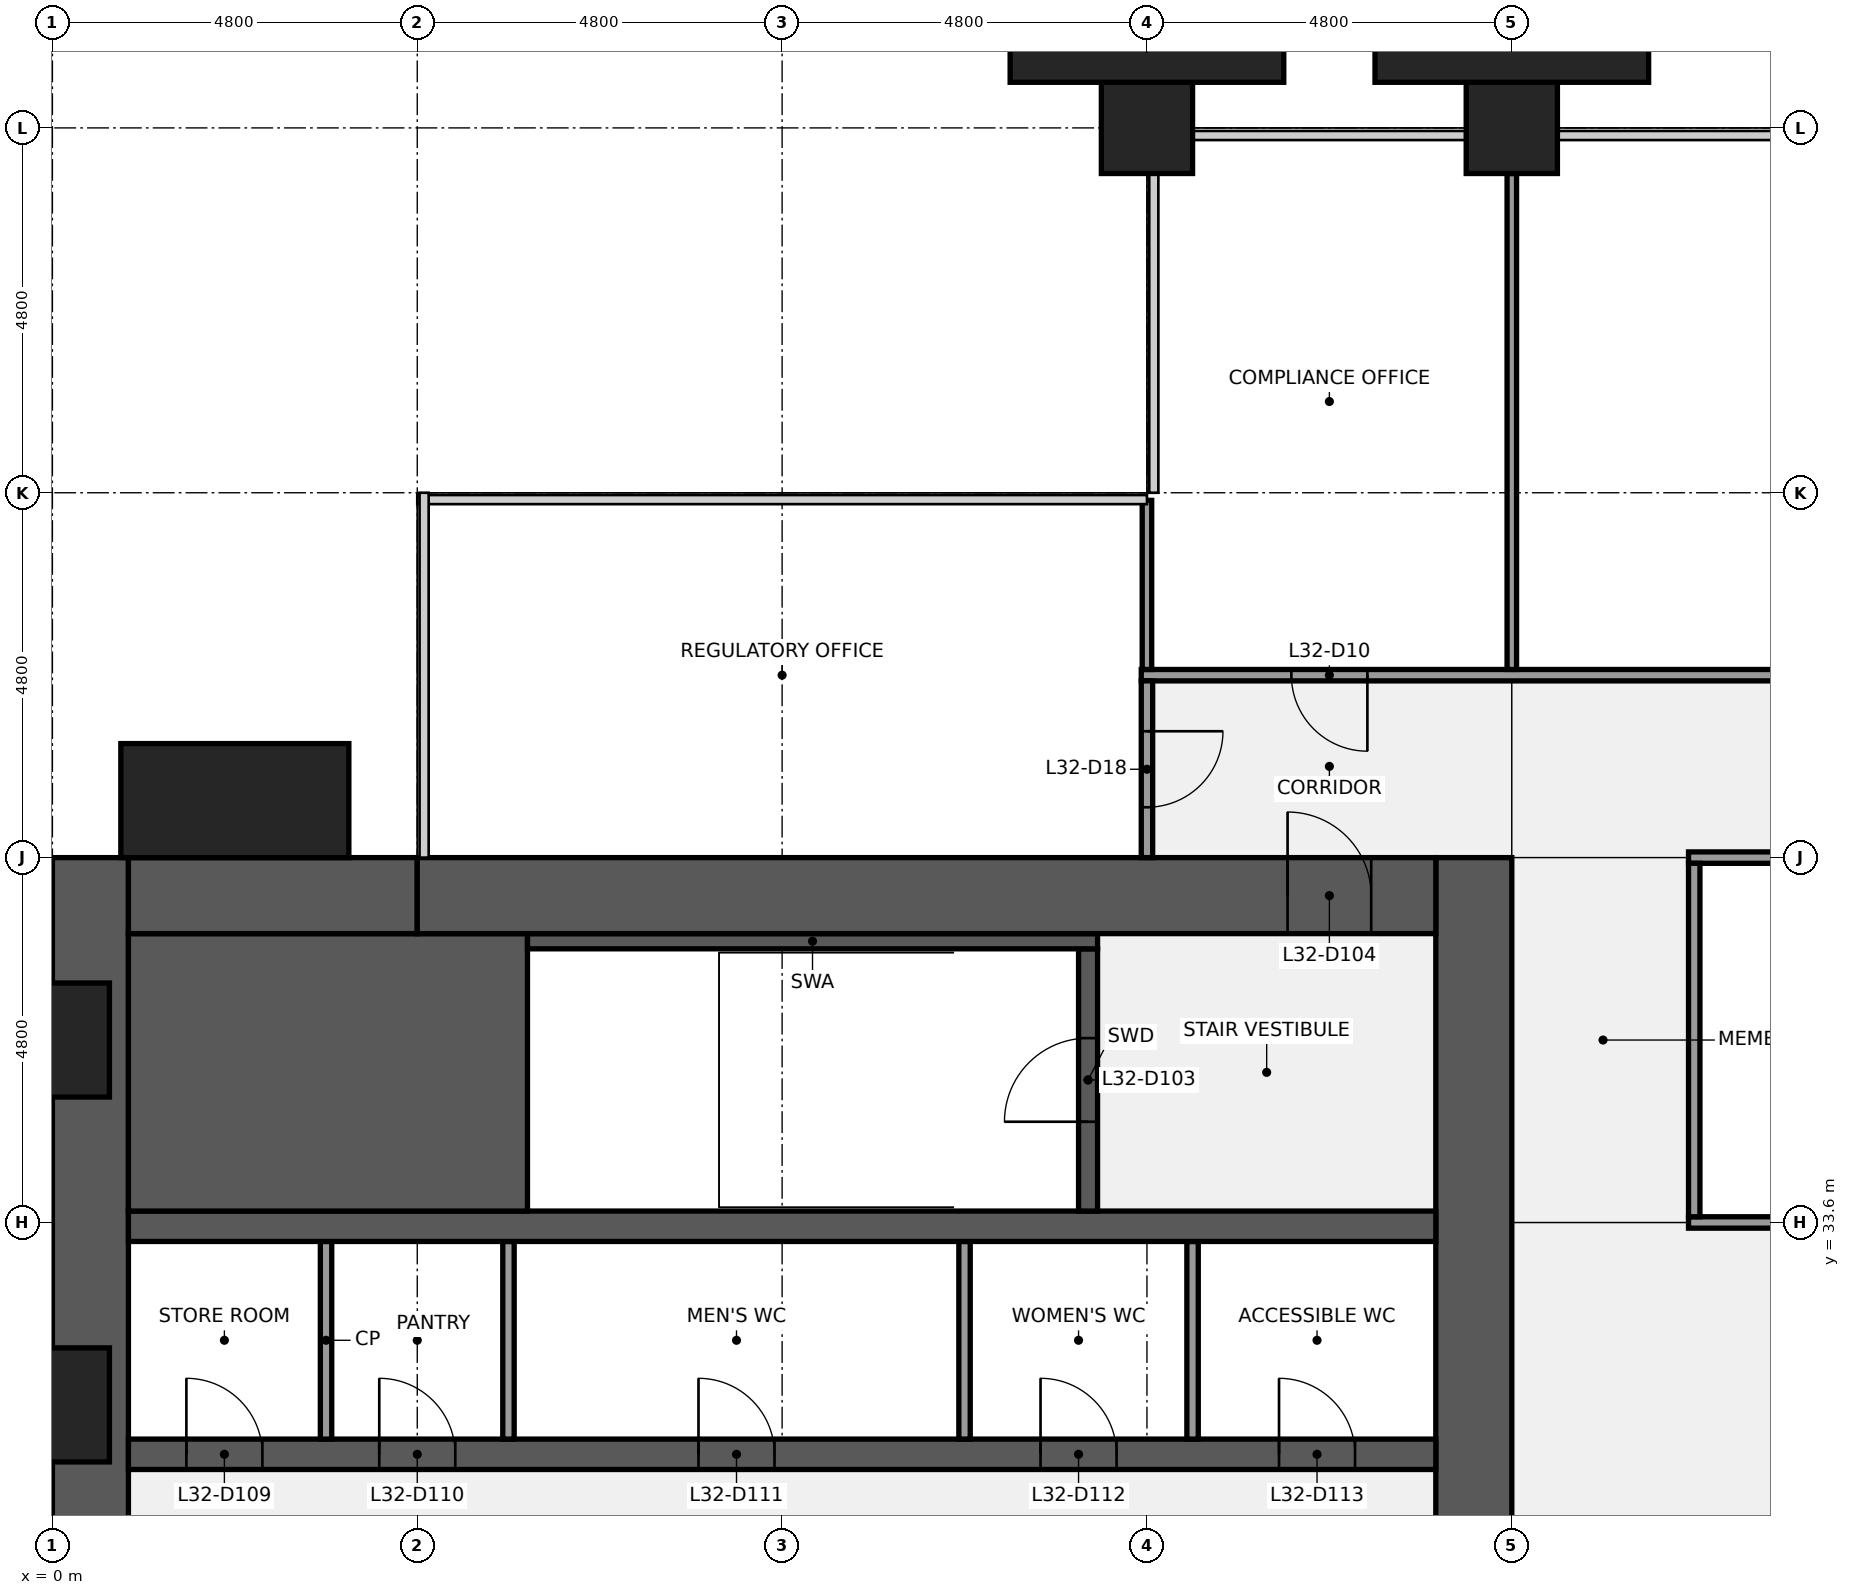
"""IFC4 building model, lengths in metres.
Left out: names, types, materials, properties, quantities, classifications, styles, units other than length and angle.
Written with IfcOpenShell. Run it as: python <this file> out.ifc"""

import sys

from ifc_helpers import new_model, si_unit, direction, frame, frame_2d, origin, origin_2d, place, context, subcontext, project, spatial, rectangle, extrude, element, fill, save


model = new_model("IFC4")
c1 = context("Model", 3, precision=1e-05, world=origin(), true_north=direction((0.0, 1.0)))
c2 = subcontext(c1, "Body", "Model", "MODEL_VIEW")
j1 = project(units=[si_unit("LENGTHUNIT", "METRE"), si_unit("PLANEANGLEUNIT", "RADIAN")], contexts=[c1])
p1 = place(None, origin())
s1 = spatial("IfcSite", under=j1, at=p1, CompositionType="ELEMENT")
p2 = place(p1, origin())
s2 = spatial("IfcBuilding", under=s1, at=p2, CompositionType="ELEMENT")
p3 = place(p2, frame((0.0, 0.0, 148.1)))
s3 = spatial("IfcBuildingStorey", under=s2, at=p3, CompositionType="ELEMENT", Elevation=148.1)
for number, where, z_axis, x_axis in (
    (1, (14.4, 48.0, 0.0), (0.0, 0.0, 1.0), (1.0, 0.0, 0.0)),
    (2, (19.2, 48.0, 0.0), (0.0, 0.0, 1.0), (1.0, 0.0, 0.0)),
):
    element("IfcColumn", number, at=place(p3, frame(where, z_axis=z_axis, x_axis=x_axis)), inside=s3, PredefinedType="COLUMN", context=c2, shape_type="SweptSolid", body=[
        extrude(rectangle(XDim=1.2, YDim=1.2, at=origin_2d()), origin(), (0.0, 0.0, 1.0), 4.0),
    ])
p4 = place(p3, frame((0.5, 9.6, 0.0), z_axis=(0.0, 0.0, 1.0), x_axis=(0.0, 1.0, 0.0)))
e3 = element("IfcWall", 3, at=p4, inside=s3, PredefinedType="SHEAR", context=c2, shape_type="SweptSolid", body=[
    extrude(rectangle(XDim=28.8, YDim=1.0, at=frame_2d((14.4, 0.0))), origin(), (0.0, 0.0, 1.0), 3.84),
])
p5 = place(p4, frame((8.85, 0.0, 0.9)))
e4 = element("IfcOpeningElement", 4, at=p5, cuts=e3, PredefinedType="OPENING", context=c2, shape_type="SweptSolid", body=[
    extrude(rectangle(XDim=1.5, YDim=1.5, at=frame_2d((0.75, 0.75))), frame((0.0, 0.51, 0.0), z_axis=(0.0, -1.0, 0.0), x_axis=(1.0, 0.0, 0.0)), (0.0, 0.0, 1.0), 1.02),
])
p6 = place(p4, frame((18.45, 0.0, 0.9)))
e5 = element("IfcOpeningElement", 5, at=p6, cuts=e3, PredefinedType="OPENING", context=c2, shape_type="SweptSolid", body=[
    extrude(rectangle(XDim=1.5, YDim=1.5, at=frame_2d((0.75, 0.75))), frame((0.0, 0.51, 0.0), z_axis=(0.0, -1.0, 0.0), x_axis=(1.0, 0.0, 0.0)), (0.0, 0.0, 1.0), 1.02),
])
p7 = place(p3, frame((18.7, 38.4, 0.0), z_axis=(0.0, 0.0, 1.0), x_axis=(0.0, -1.0, 0.0)))
e6 = element("IfcWall", 6, at=p7, inside=s3, PredefinedType="SHEAR", context=c2, shape_type="SweptSolid", body=[
    extrude(rectangle(XDim=28.8, YDim=1.0, at=frame_2d((14.4, 0.0))), origin(), (0.0, 0.0, 1.0), 3.84),
])
p8 = place(p7, frame((18.3, 0.0, 0.0)))
e7 = element("IfcOpeningElement", 7, at=p8, cuts=e6, PredefinedType="OPENING", context=c2, shape_type="SweptSolid", body=[
    extrude(rectangle(XDim=1.8, YDim=2.1, at=frame_2d((0.9, 1.05))), frame((0.0, 0.51, 0.0), z_axis=(0.0, -1.0, 0.0), x_axis=(1.0, 0.0, 0.0)), (0.0, 0.0, 1.0), 1.02),
])
p9 = place(p7, frame((8.7, 0.0, 0.0)))
e8 = element("IfcOpeningElement", 8, at=p9, cuts=e6, PredefinedType="OPENING", context=c2, shape_type="SweptSolid", body=[
    extrude(rectangle(XDim=1.8, YDim=2.1, at=frame_2d((0.9, 1.05))), frame((0.0, 0.51, 0.0), z_axis=(0.0, -1.0, 0.0), x_axis=(1.0, 0.0, 0.0)), (0.0, 0.0, 1.0), 1.02),
])
p10 = place(p3, frame((1.0, 30.55, 0.0), z_axis=(0.0, 0.0, 1.0), x_axis=(1.0, 0.0, 0.0)))
e9 = element("IfcWall", 9, at=p10, inside=s3, PredefinedType="SHEAR", context=c2, shape_type="SweptSolid", body=[
    extrude(rectangle(XDim=17.2, YDim=0.4, at=frame_2d((8.6, 0.0))), origin(), (0.0, 0.0, 1.0), 3.84),
])
p11 = place(p10, frame((0.762, 0.0, 0.0)))
e10 = element("IfcOpeningElement", 10, at=p11, cuts=e9, PredefinedType="OPENING", context=c2, shape_type="SweptSolid", body=[
    extrude(rectangle(XDim=1.0, YDim=2.1, at=frame_2d((0.5, 1.05))), frame((0.0, 0.21, 0.0), z_axis=(0.0, -1.0, 0.0), x_axis=(1.0, 0.0, 0.0)), (0.0, 0.0, 1.0), 0.42),
])
p12 = place(p10, frame((3.3, 0.0, 0.0)))
e11 = element("IfcOpeningElement", 11, at=p12, cuts=e9, PredefinedType="OPENING", context=c2, shape_type="SweptSolid", body=[
    extrude(rectangle(XDim=1.0, YDim=2.1, at=frame_2d((0.5, 1.05))), frame((0.0, 0.21, 0.0), z_axis=(0.0, -1.0, 0.0), x_axis=(1.0, 0.0, 0.0)), (0.0, 0.0, 1.0), 0.42),
])
p13 = place(p10, frame((7.5, 0.0, 0.0)))
e12 = element("IfcOpeningElement", 12, at=p13, cuts=e9, PredefinedType="OPENING", context=c2, shape_type="SweptSolid", body=[
    extrude(rectangle(XDim=1.0, YDim=2.1, at=frame_2d((0.5, 1.05))), frame((0.0, 0.21, 0.0), z_axis=(0.0, -1.0, 0.0), x_axis=(1.0, 0.0, 0.0)), (0.0, 0.0, 1.0), 0.42),
])
p14 = place(p10, frame((12.0, 0.0, 0.0)))
e13 = element("IfcOpeningElement", 13, at=p14, cuts=e9, PredefinedType="OPENING", context=c2, shape_type="SweptSolid", body=[
    extrude(rectangle(XDim=1.0, YDim=2.1, at=frame_2d((0.5, 1.05))), frame((0.0, 0.21, 0.0), z_axis=(0.0, -1.0, 0.0), x_axis=(1.0, 0.0, 0.0)), (0.0, 0.0, 1.0), 0.42),
])
p15 = place(p10, frame((15.137, 0.0, 0.0)))
e14 = element("IfcOpeningElement", 14, at=p15, cuts=e9, PredefinedType="OPENING", context=c2, shape_type="SweptSolid", body=[
    extrude(rectangle(XDim=1.0, YDim=2.1, at=frame_2d((0.5, 1.05))), frame((0.0, 0.21, 0.0), z_axis=(0.0, -1.0, 0.0), x_axis=(1.0, 0.0, 0.0)), (0.0, 0.0, 1.0), 0.42),
])
for number, where, z_axis, x_axis in (
    (15, (3.6, 30.75, 0.0), (0.0, 0.0, 1.0), (0.0, 1.0, 0.0)),
    (16, (6.0, 30.75, 0.0), (0.0, 0.0, 1.0), (0.0, 1.0, 0.0)),
    (17, (12.0, 30.75, 0.0), (0.0, 0.0, 1.0), (0.0, 1.0, 0.0)),
    (18, (15.0, 30.75, 0.0), (0.0, 0.0, 1.0), (0.0, 1.0, 0.0)),
):
    element("IfcWall", number, at=place(p3, frame(where, z_axis=z_axis, x_axis=x_axis)), inside=s3, PredefinedType="PARTITIONING", context=c2, shape_type="SweptSolid", body=[
        extrude(rectangle(XDim=2.6, YDim=0.15, at=frame_2d((1.3, 0.0))), origin(), (0.0, 0.0, 1.0), 3.84),
    ])
p16 = place(p3, frame((1.0, 33.55, 0.0), z_axis=(0.0, 0.0, 1.0), x_axis=(1.0, 0.0, 0.0)))
e19 = element("IfcWall", 19, at=p16, inside=s3, PredefinedType="SHEAR", context=c2, shape_type="SweptSolid", body=[
    extrude(rectangle(XDim=17.2, YDim=0.4, at=frame_2d((8.6, 0.0))), origin(), (0.0, 0.0, 1.0), 3.84),
])
p17 = place(p3, frame((1.0, 35.575, 0.0), z_axis=(0.0, 0.0, 1.0), x_axis=(1.0, 0.0, 0.0)))
e20 = element("IfcWall", 20, at=p17, inside=s3, PredefinedType="SHEAR", context=c2, shape_type="SweptSolid", body=[
    extrude(rectangle(XDim=5.25, YDim=3.65, at=frame_2d((2.625, 0.0))), origin(), (0.0, 0.0, 1.0), 3.84),
])
p18 = place(p3, frame((13.625, 33.75, 0.0), z_axis=(0.0, 0.0, 1.0), x_axis=(0.0, 1.0, 0.0)))
e21 = element("IfcWall", 21, at=p18, inside=s3, PredefinedType="SHEAR", context=c2, shape_type="SweptSolid", body=[
    extrude(rectangle(XDim=3.45, YDim=0.25, at=frame_2d((1.725, 0.0))), origin(), (0.0, 0.0, 1.0), 3.84),
])
p19 = place(p18, frame((1.175, 0.0, 0.0)))
e22 = element("IfcOpeningElement", 22, at=p19, cuts=e21, PredefinedType="OPENING", context=c2, shape_type="SweptSolid", body=[
    extrude(rectangle(XDim=1.1, YDim=2.1, at=frame_2d((0.55, 1.05))), frame((0.0, 0.135, 0.0), z_axis=(0.0, -1.0, 0.0), x_axis=(1.0, 0.0, 0.0)), (0.0, 0.0, 1.0), 0.27),
])
p20 = place(p3, frame((6.25, 37.3, 0.0), z_axis=(0.0, 0.0, 1.0), x_axis=(1.0, 0.0, 0.0)))
e23 = element("IfcWall", 23, at=p20, inside=s3, PredefinedType="SHEAR", context=c2, shape_type="SweptSolid", body=[
    extrude(rectangle(XDim=7.5, YDim=0.2, at=frame_2d((3.75, 0.0))), origin(), (0.0, 0.0, 1.0), 3.84),
])
p21 = place(p3, frame((1.0, 37.9, 0.0), z_axis=(0.0, 0.0, 1.0), x_axis=(1.0, 0.0, 0.0)))
e24 = element("IfcWall", 24, at=p21, inside=s3, PredefinedType="SHEAR", context=c2, shape_type="SweptSolid", body=[
    extrude(rectangle(XDim=3.8, YDim=1.0, at=frame_2d((1.9, 0.0))), origin(), (0.0, 0.0, 1.0), 3.84),
])
p22 = place(p3, frame((4.8, 37.9, 0.0), z_axis=(0.0, 0.0, 1.0), x_axis=(1.0, 0.0, 0.0)))
e25 = element("IfcWall", 25, at=p22, inside=s3, PredefinedType="SHEAR", context=c2, shape_type="SweptSolid", body=[
    extrude(rectangle(XDim=13.4, YDim=1.0, at=frame_2d((6.7, 0.0))), origin(), (0.0, 0.0, 1.0), 3.84),
])
p23 = place(p22, frame((11.45, 0.0, 0.0)))
e26 = element("IfcOpeningElement", 26, at=p23, cuts=e25, PredefinedType="OPENING", context=c2, shape_type="SweptSolid", body=[
    extrude(rectangle(XDim=1.1, YDim=2.1, at=frame_2d((0.55, 1.05))), frame((0.0, 0.51, 0.0), z_axis=(0.0, -1.0, 0.0), x_axis=(1.0, 0.0, 0.0)), (0.0, 0.0, 1.0), 1.02),
])
p24 = place(p3, frame((21.525, 33.6, 0.0), z_axis=(0.0, 0.0, 1.0), x_axis=(1.0, 0.0, 0.0)))
e27 = element("IfcWall", 27, at=p24, inside=s3, PredefinedType="PARTITIONING", context=c2, shape_type="SweptSolid", body=[
    extrude(rectangle(XDim=2.55, YDim=0.15, at=frame_2d((1.275, 0.0))), origin(), (0.0, 0.0, 1.0), 2.849),
])
p25 = place(p3, frame((21.525, 38.4, 0.0), z_axis=(0.0, 0.0, 1.0), x_axis=(1.0, 0.0, 0.0)))
e28 = element("IfcWall", 28, at=p25, inside=s3, PredefinedType="PARTITIONING", context=c2, shape_type="SweptSolid", body=[
    extrude(rectangle(XDim=14.55, YDim=0.15, at=frame_2d((7.275, 0.0))), origin(), (0.0, 0.0, 1.0), 2.849),
])
p26 = place(p25, frame((2.575, 0.0, 0.0)))
e29 = element("IfcOpeningElement", 29, at=p26, cuts=e28, PredefinedType="OPENING", context=c2, shape_type="SweptSolid", body=[
    extrude(rectangle(XDim=1.0, YDim=2.1, at=frame_2d((0.5, 1.05))), frame((0.0, 0.085, 0.0), z_axis=(0.0, -1.0, 0.0), x_axis=(1.0, 0.0, 0.0)), (0.0, 0.0, 1.0), 0.17),
])
p27 = place(p25, frame((9.775, 0.0, 0.0)))
e30 = element("IfcOpeningElement", 30, at=p27, cuts=e28, PredefinedType="OPENING", context=c2, shape_type="SweptSolid", body=[
    extrude(rectangle(XDim=1.0, YDim=2.1, at=frame_2d((0.5, 1.05))), frame((0.0, 0.085, 0.0), z_axis=(0.0, -1.0, 0.0), x_axis=(1.0, 0.0, 0.0)), (0.0, 0.0, 1.0), 0.17),
])
p28 = place(p3, frame((14.325, 40.8, 0.0), z_axis=(0.0, 0.0, 1.0), x_axis=(1.0, 0.0, 0.0)))
e31 = element("IfcWall", 31, at=p28, inside=s3, PredefinedType="PARTITIONING", context=c2, shape_type="SweptSolid", body=[
    extrude(rectangle(XDim=28.95, YDim=0.15, at=frame_2d((14.475, 0.0))), origin(), (0.0, 0.0, 1.0), 2.849),
])
p29 = place(p28, frame((1.975, 0.0, 0.0)))
e32 = element("IfcOpeningElement", 32, at=p29, cuts=e31, PredefinedType="OPENING", context=c2, shape_type="SweptSolid", body=[
    extrude(rectangle(XDim=1.0, YDim=2.1, at=frame_2d((0.5, 1.05))), frame((0.0, 0.085, 0.0), z_axis=(0.0, -1.0, 0.0), x_axis=(1.0, 0.0, 0.0)), (0.0, 0.0, 1.0), 0.17),
])
p30 = place(p28, frame((9.175, 0.0, 0.0)))
e33 = element("IfcOpeningElement", 33, at=p30, cuts=e31, PredefinedType="OPENING", context=c2, shape_type="SweptSolid", body=[
    extrude(rectangle(XDim=1.0, YDim=2.1, at=frame_2d((0.5, 1.05))), frame((0.0, 0.085, 0.0), z_axis=(0.0, -1.0, 0.0), x_axis=(1.0, 0.0, 0.0)), (0.0, 0.0, 1.0), 0.17),
])
p31 = place(p28, frame((15.175, 0.0, 0.0)))
e34 = element("IfcOpeningElement", 34, at=p31, cuts=e31, PredefinedType="OPENING", context=c2, shape_type="SweptSolid", body=[
    extrude(rectangle(XDim=1.0, YDim=2.1, at=frame_2d((0.5, 1.05))), frame((0.0, 0.085, 0.0), z_axis=(0.0, -1.0, 0.0), x_axis=(1.0, 0.0, 0.0)), (0.0, 0.0, 1.0), 0.17),
])
p32 = place(p28, frame((19.975, 0.0, 0.0)))
e35 = element("IfcOpeningElement", 35, at=p32, cuts=e31, PredefinedType="OPENING", context=c2, shape_type="SweptSolid", body=[
    extrude(rectangle(XDim=1.0, YDim=2.1, at=frame_2d((0.5, 1.05))), frame((0.0, 0.085, 0.0), z_axis=(0.0, -1.0, 0.0), x_axis=(1.0, 0.0, 0.0)), (0.0, 0.0, 1.0), 0.17),
])
p33 = place(p28, frame((25.975, 0.0, 0.0)))
e36 = element("IfcOpeningElement", 36, at=p33, cuts=e31, PredefinedType="OPENING", context=c2, shape_type="SweptSolid", body=[
    extrude(rectangle(XDim=1.0, YDim=2.1, at=frame_2d((0.5, 1.05))), frame((0.0, 0.085, 0.0), z_axis=(0.0, -1.0, 0.0), x_axis=(1.0, 0.0, 0.0)), (0.0, 0.0, 1.0), 0.17),
])
p34 = place(p3, frame((14.4, 40.875, 0.0), z_axis=(0.0, 0.0, 1.0), x_axis=(0.0, 1.0, 0.0)))
e37 = element("IfcWall", 37, at=p34, inside=s3, PredefinedType="PARTITIONING", context=c2, shape_type="SweptSolid", body=[
    extrude(rectangle(XDim=2.225, YDim=0.125, at=frame_2d((1.113, 0.0))), origin(), (0.0, 0.0, 1.0), 2.849),
])
p35 = place(p3, frame((14.4, 38.4, 0.0), z_axis=(0.0, 0.0, 1.0), x_axis=(0.0, 1.0, 0.0)))
e38 = element("IfcWall", 38, at=p35, inside=s3, PredefinedType="PARTITIONING", context=c2, shape_type="SweptSolid", body=[
    extrude(rectangle(XDim=2.325, YDim=0.15, at=frame_2d((1.163, 0.0))), origin(), (0.0, 0.0, 1.0), 2.849),
])
p36 = place(p35, frame((0.663, 0.0, 0.0)))
e39 = element("IfcOpeningElement", 39, at=p36, cuts=e38, PredefinedType="OPENING", context=c2, shape_type="SweptSolid", body=[
    extrude(rectangle(XDim=1.0, YDim=2.1, at=frame_2d((0.5, 1.05))), frame((0.0, 0.085, 0.0), z_axis=(0.0, -1.0, 0.0), x_axis=(1.0, 0.0, 0.0)), (0.0, 0.0, 1.0), 0.17),
])
p37 = place(p3, frame((19.2, 40.875, 0.0), z_axis=(0.0, 0.0, 1.0), x_axis=(0.0, 1.0, 0.0)))
e40 = element("IfcWall", 40, at=p37, inside=s3, PredefinedType="PARTITIONING", context=c2, shape_type="SweptSolid", body=[
    extrude(rectangle(XDim=6.525, YDim=0.125, at=frame_2d((3.262, 0.0))), origin(), (0.0, 0.0, 1.0), 2.849),
])
p38 = place(p3, frame((21.6, 33.675, 0.0), z_axis=(0.0, 0.0, 1.0), x_axis=(0.0, 1.0, 0.0)))
e41 = element("IfcWall", 41, at=p38, inside=s3, PredefinedType="PARTITIONING", context=c2, shape_type="SweptSolid", body=[
    extrude(rectangle(XDim=4.65, YDim=0.15, at=frame_2d((2.325, 0.0))), origin(), (0.0, 0.0, 1.0), 2.849),
])
p39 = place(p3, frame((2.4, 39.15, 0.0), z_axis=(0.0, 0.0, 1.0), x_axis=(1.0, 0.0, 0.0)))
e42 = element("IfcColumn", 42, at=p39, inside=s3, PredefinedType="PILASTER", context=c2, shape_type="SweptSolid", body=[
    extrude(rectangle(XDim=3.0, YDim=1.5, at=origin_2d()), origin(), (0.0, 0.0, 1.0), 4.0),
])
for number, where, z_axis, x_axis in (
    (43, (14.4, 49.05, 0.0), (0.0, 0.0, 1.0), (1.0, 0.0, 0.0)),
    (44, (19.2, 49.05, 0.0), (0.0, 0.0, 1.0), (1.0, 0.0, 0.0)),
):
    element("IfcColumn", number, at=place(p3, frame(where, z_axis=z_axis, x_axis=x_axis)), inside=s3, PredefinedType="PILASTER", context=c2, shape_type="SweptSolid", body=[
        extrude(rectangle(XDim=3.6, YDim=0.9, at=origin_2d()), origin(), (0.0, 0.0, 1.0), 4.0),
    ])
p40 = place(p19, origin())
e45 = element("IfcDoor", 45, at=p40, inside=s3, OperationType="SINGLE_SWING_LEFT", PredefinedType="DOOR", context=c2, shape_type="SweptSolid", body=[
    extrude(rectangle(XDim=1.1, YDim=2.1, at=frame_2d((0.55, 1.05))), frame((0.0, 0.025, 0.0), z_axis=(0.0, -1.0, 0.0), x_axis=(1.0, 0.0, 0.0)), (0.0, 0.0, 1.0), 0.05),
])
fill(e22, e45)
p41 = place(p23, origin())
e46 = element("IfcDoor", 46, at=p41, inside=s3, OperationType="SINGLE_SWING_LEFT", PredefinedType="DOOR", context=c2, shape_type="SweptSolid", body=[
    extrude(rectangle(XDim=1.1, YDim=2.1, at=frame_2d((0.55, 1.05))), frame((0.0, 0.025, 0.0), z_axis=(0.0, -1.0, 0.0), x_axis=(1.0, 0.0, 0.0)), (0.0, 0.0, 1.0), 0.05),
])
fill(e26, e46)
p42 = place(p11, origin())
e47 = element("IfcDoor", 47, at=p42, inside=s3, OperationType="SINGLE_SWING_LEFT", PredefinedType="DOOR", context=c2, shape_type="SweptSolid", body=[
    extrude(rectangle(XDim=1.0, YDim=2.1, at=frame_2d((0.5, 1.05))), frame((0.0, 0.025, 0.0), z_axis=(0.0, -1.0, 0.0), x_axis=(1.0, 0.0, 0.0)), (0.0, 0.0, 1.0), 0.05),
])
fill(e10, e47)
p43 = place(p12, origin())
e48 = element("IfcDoor", 48, at=p43, inside=s3, OperationType="SINGLE_SWING_LEFT", PredefinedType="DOOR", context=c2, shape_type="SweptSolid", body=[
    extrude(rectangle(XDim=1.0, YDim=2.1, at=frame_2d((0.5, 1.05))), frame((0.0, 0.025, 0.0), z_axis=(0.0, -1.0, 0.0), x_axis=(1.0, 0.0, 0.0)), (0.0, 0.0, 1.0), 0.05),
])
fill(e11, e48)
p44 = place(p13, origin())
e49 = element("IfcDoor", 49, at=p44, inside=s3, OperationType="SINGLE_SWING_LEFT", PredefinedType="DOOR", context=c2, shape_type="SweptSolid", body=[
    extrude(rectangle(XDim=1.0, YDim=2.1, at=frame_2d((0.5, 1.05))), frame((0.0, 0.025, 0.0), z_axis=(0.0, -1.0, 0.0), x_axis=(1.0, 0.0, 0.0)), (0.0, 0.0, 1.0), 0.05),
])
fill(e12, e49)
p45 = place(p14, origin())
e50 = element("IfcDoor", 50, at=p45, inside=s3, OperationType="SINGLE_SWING_LEFT", PredefinedType="DOOR", context=c2, shape_type="SweptSolid", body=[
    extrude(rectangle(XDim=1.0, YDim=2.1, at=frame_2d((0.5, 1.05))), frame((0.0, 0.025, 0.0), z_axis=(0.0, -1.0, 0.0), x_axis=(1.0, 0.0, 0.0)), (0.0, 0.0, 1.0), 0.05),
])
fill(e13, e50)
p46 = place(p15, origin())
e51 = element("IfcDoor", 51, at=p46, inside=s3, OperationType="SINGLE_SWING_LEFT", PredefinedType="DOOR", context=c2, shape_type="SweptSolid", body=[
    extrude(rectangle(XDim=1.0, YDim=2.1, at=frame_2d((0.5, 1.05))), frame((0.0, 0.025, 0.0), z_axis=(0.0, -1.0, 0.0), x_axis=(1.0, 0.0, 0.0)), (0.0, 0.0, 1.0), 0.05),
])
fill(e14, e51)
p47 = place(p29, origin())
e52 = element("IfcDoor", 52, at=p47, inside=s3, OperationType="SINGLE_SWING_RIGHT", PredefinedType="DOOR", context=c2, shape_type="SweptSolid", body=[
    extrude(rectangle(XDim=1.0, YDim=2.1, at=frame_2d((0.5, 1.05))), frame((0.0, 0.025, 0.0), z_axis=(0.0, -1.0, 0.0), x_axis=(1.0, 0.0, 0.0)), (0.0, 0.0, 1.0), 0.05),
])
fill(e32, e52)
p48 = place(p36, origin())
e53 = element("IfcDoor", 53, at=p48, inside=s3, OperationType="SINGLE_SWING_RIGHT", PredefinedType="DOOR", context=c2, shape_type="SweptSolid", body=[
    extrude(rectangle(XDim=1.0, YDim=2.1, at=frame_2d((0.5, 1.05))), frame((0.0, 0.025, 0.0), z_axis=(0.0, -1.0, 0.0), x_axis=(1.0, 0.0, 0.0)), (0.0, 0.0, 1.0), 0.05),
])
fill(e39, e53)
save(model, sys.argv[1])
